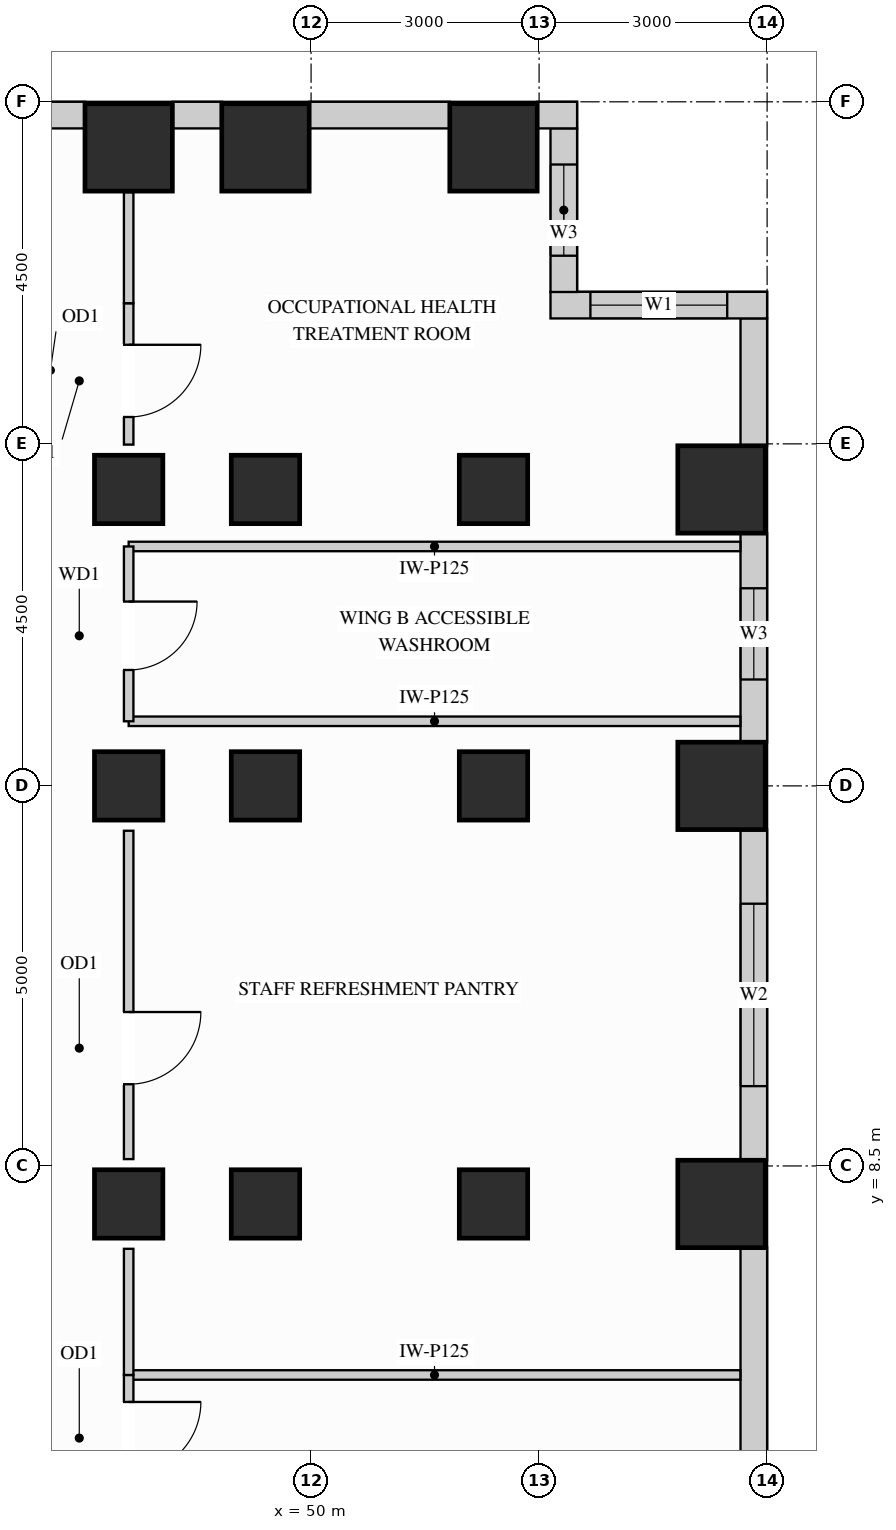
"""IFC4 building model, lengths in metres.
Left out: names, types, materials, properties, quantities, classifications, styles, units other than length and angle.
Written with IfcOpenShell. Run it as: python <this file> out.ifc"""

import sys

from ifc_helpers import new_model, si_unit, direction, frame, frame_2d, origin, origin_2d, place, context, subcontext, project, spatial, rectangle, extrude, source, transform, mapped, element, fill, save


model = new_model("IFC4")
c1 = context("Model", 3, precision=1e-05, world=origin(), true_north=direction((0.0, 1.0)))
c2 = subcontext(c1, "Body", "Model", "MODEL_VIEW")
j1 = project(units=[si_unit("LENGTHUNIT", "METRE"), si_unit("PLANEANGLEUNIT", "RADIAN")], contexts=[c1])
p1 = place(None, origin())
s1 = spatial("IfcSite", under=j1, at=p1, CompositionType="ELEMENT")
p2 = place(p1, origin())
s2 = spatial("IfcBuilding", under=s1, at=p2, CompositionType="ELEMENT")
p3 = place(p2, frame((0.0, 0.0, 91.8)))
s3 = spatial("IfcBuildingStorey", under=s2, at=p3, CompositionType="ELEMENT", Elevation=91.8)
m1 = source(origin(), c2, "Body", "SweptSolid", [
    extrude(rectangle(XDim=0.9, YDim=0.9, at=origin_2d()), origin(), (0.0, 0.0, 1.0), 3.38),
])
for number, where, z_axis, x_axis in (
    (1, (47.6, 13.5, 0.0), (0.0, 0.0, 1.0), (1.0, 0.0, 0.0)),
    (2, (47.6, 8.0, 0.0), (0.0, 0.0, 1.0), (1.0, 0.0, 0.0)),
    (3, (47.6, 17.4, 0.0), (0.0, 0.0, 1.0), (1.0, 0.0, 0.0)),
    (4, (49.4, 13.5, 0.0), (0.0, 0.0, 1.0), (1.0, 0.0, 0.0)),
    (5, (49.4, 17.4, 0.0), (0.0, 0.0, 1.0), (1.0, 0.0, 0.0)),
    (6, (49.4, 8.0, 0.0), (0.0, 0.0, 1.0), (1.0, 0.0, 0.0)),
    (7, (52.4, 13.5, 0.0), (0.0, 0.0, 1.0), (1.0, 0.0, 0.0)),
    (8, (52.4, 17.4, 0.0), (0.0, 0.0, 1.0), (1.0, 0.0, 0.0)),
    (9, (52.4, 8.0, 0.0), (0.0, 0.0, 1.0), (1.0, 0.0, 0.0)),
):
    element("IfcColumn", number, at=place(p3, frame(where, z_axis=z_axis, x_axis=x_axis)), inside=s3, PredefinedType="COLUMN", context=c2, shape_type="MappedRepresentation", body=[
        mapped(m1, transform((0.0, 0.0, 0.0), x_axis=(1.0, 0.0, 0.0), y_axis=(0.0, 1.0, 0.0), z_axis=(0.0, 0.0, 1.0))),
    ])
m2 = source(origin(), c2, "Body", "SweptSolid", [
    extrude(rectangle(XDim=1.15, YDim=1.15, at=origin_2d()), origin(), (0.0, 0.0, 1.0), 3.38),
])
for number, where, z_axis, x_axis in (
    (10, (47.6, 21.9, 0.0), (0.0, 0.0, 1.0), (1.0, 0.0, 0.0)),
    (11, (49.4, 21.9, 0.0), (0.0, 0.0, 1.0), (1.0, 0.0, 0.0)),
    (12, (52.4, 21.9, 0.0), (0.0, 0.0, 1.0), (1.0, 0.0, 0.0)),
    (13, (55.4, 13.5, 0.0), (0.0, 0.0, 1.0), (1.0, 0.0, 0.0)),
    (14, (55.4, 17.4, 0.0), (0.0, 0.0, 1.0), (1.0, 0.0, 0.0)),
    (15, (55.4, 8.0, 0.0), (0.0, 0.0, 1.0), (1.0, 0.0, 0.0)),
):
    element("IfcColumn", number, at=place(p3, frame(where, z_axis=z_axis, x_axis=x_axis)), inside=s3, PredefinedType="COLUMN", context=c2, shape_type="MappedRepresentation", body=[
        mapped(m2, transform((0.0, 0.0, 0.0), x_axis=(1.0, 0.0, 0.0), y_axis=(0.0, 1.0, 0.0), z_axis=(0.0, 0.0, 1.0))),
    ])
m3 = source(origin(), c2, "Body", "SweptSolid", [
    extrude(rectangle(XDim=3.354, YDim=0.35, at=frame_2d((1.677, 0.0))), origin(), (0.0, 0.0, 1.0), 3.365),
])
p4 = place(p3, frame((55.825, 4.073, 0.0), z_axis=(0.0, 0.0, 1.0), x_axis=(0.0, 1.0, 0.0)))
e16 = element("IfcWall", 16, at=p4, inside=s3, PredefinedType="SOLIDWALL", context=c2, shape_type="MappedRepresentation", body=[
    mapped(m3, transform((0.0, 0.0, 0.0), x_axis=(1.0, 0.0, 0.0), y_axis=(0.0, 1.0, 0.0), z_axis=(0.0, 0.0, 1.0))),
])
p5 = place(p3, frame((55.825, 8.573, 0.0), z_axis=(0.0, 0.0, 1.0), x_axis=(0.0, 1.0, 0.0)))
e17 = element("IfcWall", 17, at=p5, inside=s3, PredefinedType="SOLIDWALL", context=c2, shape_type="SweptSolid", body=[
    extrude(rectangle(XDim=4.354, YDim=0.35, at=frame_2d((2.177, 0.0))), origin(), (0.0, 0.0, 1.0), 3.365),
])
p6 = place(p5, frame((0.977, 0.0, 0.78)))
e18 = element("IfcOpeningElement", 18, at=p6, cuts=e17, PredefinedType="OPENING", context=c2, shape_type="SweptSolid", body=[
    extrude(rectangle(XDim=2.4, YDim=2.1, at=frame_2d((1.2, 1.05))), frame((0.0, 0.185, 0.0), z_axis=(0.0, -1.0, 0.0), x_axis=(1.0, 0.0, 0.0)), (0.0, 0.0, 1.0), 0.37),
])
p7 = place(p3, frame((55.825, 14.073, 0.0), z_axis=(0.0, 0.0, 1.0), x_axis=(0.0, 1.0, 0.0)))
e19 = element("IfcWall", 19, at=p7, inside=s3, PredefinedType="SOLIDWALL", context=c2, shape_type="SweptSolid", body=[
    extrude(rectangle(XDim=2.754, YDim=0.35, at=frame_2d((1.377, 0.0))), origin(), (0.0, 0.0, 1.0), 3.365),
])
p8 = place(p7, frame((0.827, 0.0, 0.78)))
e20 = element("IfcOpeningElement", 20, at=p8, cuts=e19, PredefinedType="OPENING", context=c2, shape_type="SweptSolid", body=[
    extrude(rectangle(XDim=1.2, YDim=2.1, at=frame_2d((0.6, 1.05))), frame((0.0, 0.185, 0.0), z_axis=(0.0, -1.0, 0.0), x_axis=(1.0, 0.0, 0.0)), (0.0, 0.0, 1.0), 0.37),
])
m4 = source(origin(), c2, "Body", "SweptSolid", [
    extrude(rectangle(XDim=1.679, YDim=0.35, at=frame_2d((0.84, 0.0))), origin(), (0.0, 0.0, 1.0), 3.365),
])
p9 = place(p3, frame((55.825, 17.973, 0.0), z_axis=(0.0, 0.0, 1.0), x_axis=(0.0, 1.0, 0.0)))
e21 = element("IfcWall", 21, at=p9, inside=s3, PredefinedType="SOLIDWALL", context=c2, shape_type="MappedRepresentation", body=[
    mapped(m4, transform((0.0, 0.0, 0.0), x_axis=(1.0, 0.0, 0.0), y_axis=(0.0, 1.0, 0.0), z_axis=(0.0, 0.0, 1.0))),
])
p10 = place(p3, frame((56.0, 19.825, 0.0), z_axis=(0.0, 0.0, 1.0), x_axis=(-1.0, 0.0, 0.0)))
e22 = element("IfcWall", 22, at=p10, inside=s3, PredefinedType="SOLIDWALL", context=c2, shape_type="SweptSolid", body=[
    extrude(rectangle(XDim=2.85, YDim=0.35, at=frame_2d((1.425, 0.0))), origin(), (0.0, 0.0, 1.0), 3.365),
])
p11 = place(p10, frame((0.525, 0.0, 0.78)))
e23 = element("IfcOpeningElement", 23, at=p11, cuts=e22, PredefinedType="OPENING", context=c2, shape_type="SweptSolid", body=[
    extrude(rectangle(XDim=1.8, YDim=2.1, at=frame_2d((0.9, 1.05))), frame((0.0, 0.185, 0.0), z_axis=(0.0, -1.0, 0.0), x_axis=(1.0, 0.0, 0.0)), (0.0, 0.0, 1.0), 0.37),
])
p12 = place(p3, frame((53.325, 19.998, 0.0), z_axis=(0.0, 0.0, 1.0), x_axis=(0.0, 1.0, 0.0)))
e24 = element("IfcWall", 24, at=p12, inside=s3, PredefinedType="SOLIDWALL", context=c2, shape_type="SweptSolid", body=[
    extrude(rectangle(XDim=2.154, YDim=0.35, at=frame_2d((1.077, 0.0))), origin(), (0.0, 0.0, 1.0), 3.365),
])
p13 = place(p12, frame((0.477, 0.0, 0.78)))
e25 = element("IfcOpeningElement", 25, at=p13, cuts=e24, PredefinedType="OPENING", context=c2, shape_type="SweptSolid", body=[
    extrude(rectangle(XDim=1.2, YDim=2.1, at=frame_2d((0.6, 1.05))), frame((0.0, 0.185, 0.0), z_axis=(0.0, -1.0, 0.0), x_axis=(1.0, 0.0, 0.0)), (0.0, 0.0, 1.0), 0.37),
])
m5 = source(origin(), c2, "Body", "SweptSolid", [
    extrude(rectangle(XDim=0.527, YDim=0.35, at=frame_2d((0.264, 0.0))), origin(), (0.0, 0.0, 1.0), 3.365),
])
p14 = place(p3, frame((53.5, 22.325, 0.0), z_axis=(0.0, 0.0, 1.0), x_axis=(-1.0, 0.0, 0.0)))
e26 = element("IfcWall", 26, at=p14, inside=s3, PredefinedType="SOLIDWALL", context=c2, shape_type="MappedRepresentation", body=[
    mapped(m5, transform((0.0, 0.0, 0.0), x_axis=(1.0, 0.0, 0.0), y_axis=(0.0, 1.0, 0.0), z_axis=(0.0, 0.0, 1.0))),
])
m6 = source(origin(), c2, "Body", "SweptSolid", [
    extrude(rectangle(XDim=1.854, YDim=0.35, at=frame_2d((0.927, 0.0))), origin(), (0.0, 0.0, 1.0), 3.365),
])
p15 = place(p3, frame((51.827, 22.325, 0.0), z_axis=(0.0, 0.0, 1.0), x_axis=(-1.0, 0.0, 0.0)))
e27 = element("IfcWall", 27, at=p15, inside=s3, PredefinedType="SOLIDWALL", context=c2, shape_type="MappedRepresentation", body=[
    mapped(m6, transform((0.0, 0.0, 0.0), x_axis=(1.0, 0.0, 0.0), y_axis=(0.0, 1.0, 0.0), z_axis=(0.0, 0.0, 1.0))),
])
m7 = source(origin(), c2, "Body", "SweptSolid", [
    extrude(rectangle(XDim=0.654, YDim=0.35, at=frame_2d((0.327, 0.0))), origin(), (0.0, 0.0, 1.0), 3.365),
])
p16 = place(p3, frame((48.827, 22.325, 0.0), z_axis=(0.0, 0.0, 1.0), x_axis=(-1.0, 0.0, 0.0)))
e28 = element("IfcWall", 28, at=p16, inside=s3, PredefinedType="SOLIDWALL", context=c2, shape_type="MappedRepresentation", body=[
    mapped(m7, transform((0.0, 0.0, 0.0), x_axis=(1.0, 0.0, 0.0), y_axis=(0.0, 1.0, 0.0), z_axis=(0.0, 0.0, 1.0))),
])
p17 = place(p3, frame((47.027, 22.325, 0.0), z_axis=(0.0, 0.0, 1.0), x_axis=(-1.0, 0.0, 0.0)))
e29 = element("IfcWall", 29, at=p17, inside=s3, PredefinedType="SOLIDWALL", context=c2, shape_type="SweptSolid", body=[
    extrude(rectangle(XDim=6.454, YDim=0.35, at=frame_2d((3.227, 0.0))), origin(), (0.0, 0.0, 1.0), 3.365),
])
p18 = place(p17, frame((1.749, 0.0, 0.78)))
e30 = element("IfcOpeningElement", 30, at=p18, cuts=e29, PredefinedType="OPENING", context=c2, shape_type="SweptSolid", body=[
    extrude(rectangle(XDim=1.8, YDim=2.1, at=frame_2d((0.9, 1.05))), frame((0.0, 0.185, 0.0), z_axis=(0.0, -1.0, 0.0), x_axis=(1.0, 0.0, 0.0)), (0.0, 0.0, 1.0), 0.37),
])
p19 = place(p17, frame((3.942, 0.0, 0.78)))
e31 = element("IfcOpeningElement", 31, at=p19, cuts=e29, PredefinedType="OPENING", context=c2, shape_type="SweptSolid", body=[
    extrude(rectangle(XDim=1.8, YDim=2.1, at=frame_2d((0.9, 1.05))), frame((0.0, 0.185, 0.0), z_axis=(0.0, -1.0, 0.0), x_axis=(1.0, 0.0, 0.0)), (0.0, 0.0, 1.0), 0.37),
])
m8 = source(origin(), c2, "Body", "SweptSolid", [
    extrude(rectangle(XDim=8.048, YDim=0.125, at=frame_2d((4.024, 0.0))), origin(), (0.0, 0.0, 1.0), 3.365),
])
p20 = place(p3, frame((47.6, 14.35, 0.0), z_axis=(0.0, 0.0, 1.0), x_axis=(1.0, 0.0, 0.0)))
e32 = element("IfcWall", 32, at=p20, inside=s3, PredefinedType="PARTITIONING", context=c2, shape_type="MappedRepresentation", body=[
    mapped(m8, transform((0.0, 0.0, 0.0), x_axis=(1.0, 0.0, 0.0), y_axis=(0.0, 1.0, 0.0), z_axis=(0.0, 0.0, 1.0))),
])
m9 = source(origin(), c2, "Body", "SweptSolid", [
    extrude(rectangle(XDim=8.048, YDim=0.125, at=frame_2d((4.024, 0.0))), origin(), (0.0, 0.0, 1.0), 2.677),
])
p21 = place(p3, frame((47.6, 16.65, 0.0), z_axis=(0.0, 0.0, 1.0), x_axis=(1.0, 0.0, 0.0)))
e33 = element("IfcWall", 33, at=p21, inside=s3, PredefinedType="PARTITIONING", context=c2, shape_type="MappedRepresentation", body=[
    mapped(m9, transform((0.0, 0.0, 0.0), x_axis=(1.0, 0.0, 0.0), y_axis=(0.0, 1.0, 0.0), z_axis=(0.0, 0.0, 1.0))),
])
p22 = place(p3, frame((47.6, 5.75, 0.0), z_axis=(0.0, 0.0, 1.0), x_axis=(1.0, 0.0, 0.0)))
e34 = element("IfcWall", 34, at=p22, inside=s3, PredefinedType="PARTITIONING", context=c2, shape_type="MappedRepresentation", body=[
    mapped(m8, transform((0.0, 0.0, 0.0), x_axis=(1.0, 0.0, 0.0), y_axis=(0.0, 1.0, 0.0), z_axis=(0.0, 0.0, 1.0))),
])
p23 = place(p3, frame((47.6, 4.09, 0.0), z_axis=(0.0, 0.0, 1.0), x_axis=(0.0, 1.0, 0.0)))
e35 = element("IfcWall", 35, at=p23, inside=s3, PredefinedType="PARTITIONING", context=c2, shape_type="SweptSolid", body=[
    extrude(rectangle(XDim=1.66, YDim=0.125, at=frame_2d((0.83, 0.0))), origin(), (0.0, 0.0, 1.0), 2.677),
])
p24 = place(p23, frame((0.355, 0.0, 0.0)))
e36 = element("IfcOpeningElement", 36, at=p24, cuts=e35, PredefinedType="OPENING", context=c2, shape_type="SweptSolid", body=[
    extrude(rectangle(XDim=0.95, YDim=2.15, at=frame_2d((0.475, 1.075))), frame((0.0, 0.073, 0.0), z_axis=(0.0, -1.0, 0.0), x_axis=(1.0, 0.0, 0.0)), (0.0, 0.0, 1.0), 0.145),
])
m10 = source(origin(), c2, "Body", "SweptSolid", [
    extrude(rectangle(XDim=1.66, YDim=0.125, at=frame_2d((0.83, 0.0))), origin(), (0.0, 0.0, 1.0), 2.677),
])
p25 = place(p3, frame((47.6, 5.75, 0.0), z_axis=(0.0, 0.0, 1.0), x_axis=(0.0, 1.0, 0.0)))
e37 = element("IfcWall", 37, at=p25, inside=s3, PredefinedType="PARTITIONING", context=c2, shape_type="MappedRepresentation", body=[
    mapped(m10, transform((0.0, 0.0, 0.0), x_axis=(1.0, 0.0, 0.0), y_axis=(0.0, 1.0, 0.0), z_axis=(0.0, 0.0, 1.0))),
])
p26 = place(p3, frame((47.6, 8.59, 0.0), z_axis=(0.0, 0.0, 1.0), x_axis=(0.0, 1.0, 0.0)))
e38 = element("IfcWall", 38, at=p26, inside=s3, PredefinedType="PARTITIONING", context=c2, shape_type="SweptSolid", body=[
    extrude(rectangle(XDim=4.32, YDim=0.125, at=frame_2d((2.16, 0.0))), origin(), (0.0, 0.0, 1.0), 2.677),
])
p27 = place(p26, frame((0.985, 0.0, 0.0)))
e39 = element("IfcOpeningElement", 39, at=p27, cuts=e38, PredefinedType="OPENING", context=c2, shape_type="SweptSolid", body=[
    extrude(rectangle(XDim=0.95, YDim=2.15, at=frame_2d((0.475, 1.075))), frame((0.0, 0.073, 0.0), z_axis=(0.0, -1.0, 0.0), x_axis=(1.0, 0.0, 0.0)), (0.0, 0.0, 1.0), 0.145),
])
p28 = place(p3, frame((47.6, 17.99, 0.0), z_axis=(0.0, 0.0, 1.0), x_axis=(0.0, 1.0, 0.0)))
e40 = element("IfcWall", 40, at=p28, inside=s3, PredefinedType="PARTITIONING", context=c2, shape_type="SweptSolid", body=[
    extrude(rectangle(XDim=1.86, YDim=0.125, at=frame_2d((0.93, 0.0))), origin(), (0.0, 0.0, 1.0), 2.677),
])
p29 = place(p28, frame((0.363, 0.0, 0.0)))
e41 = element("IfcOpeningElement", 41, at=p29, cuts=e40, PredefinedType="OPENING", context=c2, shape_type="SweptSolid", body=[
    extrude(rectangle(XDim=0.95, YDim=2.15, at=frame_2d((0.475, 1.075))), frame((0.0, 0.073, 0.0), z_axis=(0.0, -1.0, 0.0), x_axis=(1.0, 0.0, 0.0)), (0.0, 0.0, 1.0), 0.145),
])
m11 = source(origin(), c2, "Body", "SweptSolid", [
    extrude(rectangle(XDim=1.46, YDim=0.125, at=frame_2d((0.73, 0.0))), origin(), (0.0, 0.0, 1.0), 2.677),
])
p30 = place(p3, frame((47.6, 19.85, 0.0), z_axis=(0.0, 0.0, 1.0), x_axis=(0.0, 1.0, 0.0)))
e42 = element("IfcWall", 42, at=p30, inside=s3, PredefinedType="PARTITIONING", context=c2, shape_type="MappedRepresentation", body=[
    mapped(m11, transform((0.0, 0.0, 0.0), x_axis=(1.0, 0.0, 0.0), y_axis=(0.0, 1.0, 0.0), z_axis=(0.0, 0.0, 1.0))),
])
p31 = place(p3, frame((47.6, 14.35, 0.0), z_axis=(0.0, 0.0, 1.0), x_axis=(0.0, 1.0, 0.0)))
e43 = element("IfcWall", 43, at=p31, inside=s3, PredefinedType="PARTITIONING", context=c2, shape_type="SweptSolid", body=[
    extrude(rectangle(XDim=2.3, YDim=0.125, at=frame_2d((1.15, 0.0))), origin(), (0.0, 0.0, 1.0), 2.677),
])
p32 = place(p31, frame((0.675, 0.0, 0.0)))
e44 = element("IfcOpeningElement", 44, at=p32, cuts=e43, PredefinedType="OPENING", context=c2, shape_type="SweptSolid", body=[
    extrude(rectangle(XDim=0.9, YDim=2.15, at=frame_2d((0.45, 1.075))), frame((0.0, 0.073, 0.0), z_axis=(0.0, -1.0, 0.0), x_axis=(1.0, 0.0, 0.0)), (0.0, 0.0, 1.0), 0.145),
])
m12 = source(origin(), c2, "Body", "SweptSolid", [
    extrude(rectangle(XDim=0.95, YDim=2.15, at=frame_2d((0.475, 1.075))), frame((0.0, 0.025, 0.0), z_axis=(0.0, -1.0, 0.0), x_axis=(1.0, 0.0, 0.0)), (0.0, 0.0, 1.0), 0.05),
])
p33 = place(p24, origin())
e45 = element("IfcDoor", 45, at=p33, inside=s3, OperationType="SINGLE_SWING_RIGHT", PredefinedType="DOOR", context=c2, shape_type="MappedRepresentation", body=[
    mapped(m12, transform((0.0, 0.0, 0.0), x_axis=(1.0, 0.0, 0.0), y_axis=(0.0, 1.0, 0.0), z_axis=(0.0, 0.0, 1.0))),
])
fill(e36, e45)
p34 = place(p27, origin())
e46 = element("IfcDoor", 46, at=p34, inside=s3, OperationType="SINGLE_SWING_RIGHT", PredefinedType="DOOR", context=c2, shape_type="MappedRepresentation", body=[
    mapped(m12, transform((0.0, 0.0, 0.0), x_axis=(1.0, 0.0, 0.0), y_axis=(0.0, 1.0, 0.0), z_axis=(0.0, 0.0, 1.0))),
])
fill(e39, e46)
p35 = place(p29, origin())
e47 = element("IfcDoor", 47, at=p35, inside=s3, OperationType="SINGLE_SWING_RIGHT", PredefinedType="DOOR", context=c2, shape_type="MappedRepresentation", body=[
    mapped(m12, transform((0.0, 0.0, 0.0), x_axis=(1.0, 0.0, 0.0), y_axis=(0.0, 1.0, 0.0), z_axis=(0.0, 0.0, 1.0))),
])
fill(e41, e47)
m13 = source(origin(), c2, "Body", "SweptSolid", [
    extrude(rectangle(XDim=0.9, YDim=2.15, at=frame_2d((0.45, 1.075))), frame((0.0, 0.025, 0.0), z_axis=(0.0, -1.0, 0.0), x_axis=(1.0, 0.0, 0.0)), (0.0, 0.0, 1.0), 0.05),
])
p36 = place(p32, origin())
e48 = element("IfcDoor", 48, at=p36, inside=s3, OperationType="SINGLE_SWING_RIGHT", PredefinedType="DOOR", context=c2, shape_type="MappedRepresentation", body=[
    mapped(m13, transform((0.0, 0.0, 0.0), x_axis=(1.0, 0.0, 0.0), y_axis=(0.0, 1.0, 0.0), z_axis=(0.0, 0.0, 1.0))),
])
fill(e44, e48)
m14 = source(origin(), c2, "Body", "SweptSolid", [
    extrude(rectangle(XDim=1.8, YDim=2.1, at=frame_2d((0.9, 1.05))), frame((0.0, 0.03, 0.0), z_axis=(0.0, -1.0, 0.0), x_axis=(1.0, 0.0, 0.0)), (0.0, 0.0, 1.0), 0.06),
])
p37 = place(p11, origin())
e49 = element("IfcWindow", 49, at=p37, inside=s3, PartitioningType="SINGLE_PANEL", PredefinedType="WINDOW", context=c2, shape_type="MappedRepresentation", body=[
    mapped(m14, transform((0.0, 0.0, 0.0), x_axis=(1.0, 0.0, 0.0), y_axis=(0.0, 1.0, 0.0), z_axis=(0.0, 0.0, 1.0))),
])
fill(e23, e49)
m15 = source(origin(), c2, "Body", "SweptSolid", [
    extrude(rectangle(XDim=2.4, YDim=2.1, at=frame_2d((1.2, 1.05))), frame((0.0, 0.03, 0.0), z_axis=(0.0, -1.0, 0.0), x_axis=(1.0, 0.0, 0.0)), (0.0, 0.0, 1.0), 0.06),
])
p38 = place(p6, origin())
e50 = element("IfcWindow", 50, at=p38, inside=s3, PartitioningType="SINGLE_PANEL", PredefinedType="WINDOW", context=c2, shape_type="MappedRepresentation", body=[
    mapped(m15, transform((0.0, 0.0, 0.0), x_axis=(1.0, 0.0, 0.0), y_axis=(0.0, 1.0, 0.0), z_axis=(0.0, 0.0, 1.0))),
])
fill(e18, e50)
m16 = source(origin(), c2, "Body", "SweptSolid", [
    extrude(rectangle(XDim=1.2, YDim=2.1, at=frame_2d((0.6, 1.05))), frame((0.0, 0.03, 0.0), z_axis=(0.0, -1.0, 0.0), x_axis=(1.0, 0.0, 0.0)), (0.0, 0.0, 1.0), 0.06),
])
p39 = place(p8, origin())
e51 = element("IfcWindow", 51, at=p39, inside=s3, PartitioningType="SINGLE_PANEL", PredefinedType="WINDOW", context=c2, shape_type="MappedRepresentation", body=[
    mapped(m16, transform((0.0, 0.0, 0.0), x_axis=(1.0, 0.0, 0.0), y_axis=(0.0, 1.0, 0.0), z_axis=(0.0, 0.0, 1.0))),
])
fill(e20, e51)
p40 = place(p13, origin())
e52 = element("IfcWindow", 52, at=p40, inside=s3, PartitioningType="SINGLE_PANEL", PredefinedType="WINDOW", context=c2, shape_type="MappedRepresentation", body=[
    mapped(m16, transform((0.0, 0.0, 0.0), x_axis=(1.0, 0.0, 0.0), y_axis=(0.0, 1.0, 0.0), z_axis=(0.0, 0.0, 1.0))),
])
fill(e25, e52)
save(model, sys.argv[1])
